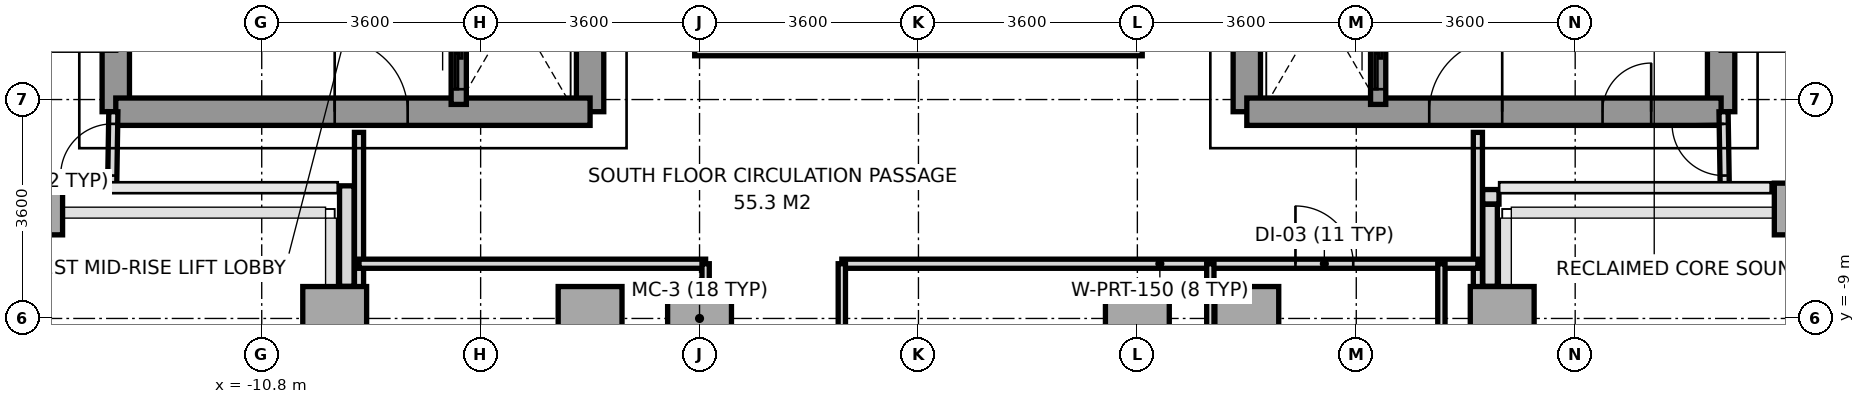
"""IFC4 building model, lengths in metres.
Left out: names, types, materials, properties, quantities, classifications, styles, units other than length and angle.
Written with IfcOpenShell. Run it as: python <this file> out.ifc"""

import sys

from ifc_helpers import new_model, si_unit, direction, frame, frame_2d, origin, origin_2d, place, context, subcontext, project, spatial, rectangle, extrude, source, transform, mapped, element, fill, save


model = new_model("IFC4")
c1 = context("Model", 3, precision=1e-05, world=origin(), true_north=direction((0.0, 1.0)))
c2 = subcontext(c1, "Body", "Model", "MODEL_VIEW")
j1 = project(units=[si_unit("LENGTHUNIT", "METRE"), si_unit("PLANEANGLEUNIT", "RADIAN")], contexts=[c1])
p1 = place(None, origin())
s1 = spatial("IfcSite", under=j1, at=p1, CompositionType="ELEMENT")
p2 = place(p1, origin())
s2 = spatial("IfcBuilding", under=s1, at=p2, CompositionType="ELEMENT")
p3 = place(p2, frame((0.0, 0.0, 134.6)))
s3 = spatial("IfcBuildingStorey", under=s2, at=p3, CompositionType="ELEMENT", Elevation=134.6)
m1 = source(origin(), c2, "Body", "SweptSolid", [
    extrude(rectangle(XDim=0.65, YDim=0.85, at=origin_2d()), origin(), (0.0, 0.0, 1.0), 3.2),
])
p4 = place(p3, frame((-14.4, -7.2, 0.0), z_axis=(0.0, 0.0, 1.0), x_axis=(1.0, 0.0, 0.0)))
e1 = element("IfcColumn", 1, at=p4, inside=s3, PredefinedType="COLUMN", context=c2, shape_type="MappedRepresentation", body=[
    mapped(m1, transform((0.0, 0.0, 0.0), x_axis=(1.0, 0.0, 0.0), y_axis=(0.0, 1.0, 0.0), z_axis=(0.0, 0.0, 1.0), scale=1.0)),
])
m2 = source(origin(), c2, "Body", "SweptSolid", [
    extrude(rectangle(XDim=1.05, YDim=1.05, at=origin_2d()), origin(), (0.0, 0.0, 1.0), 3.2),
])
for number, where, z_axis, x_axis in (
    (2, (-9.6, -9.0, 0.0), (0.0, 0.0, 1.0), (1.0, 0.0, 0.0)),
    (3, (-5.4, -9.0, 0.0), (0.0, 0.0, 1.0), (1.0, 0.0, 0.0)),
    (4, (-3.6, -9.0, 0.0), (0.0, 0.0, 1.0), (1.0, 0.0, 0.0)),
    (5, (3.6, -9.0, 0.0), (0.0, 0.0, 1.0), (1.0, 0.0, 0.0)),
    (6, (5.4, -9.0, 0.0), (0.0, 0.0, 1.0), (1.0, 0.0, 0.0)),
    (7, (9.6, -9.0, 0.0), (0.0, 0.0, 1.0), (1.0, 0.0, 0.0)),
):
    element("IfcColumn", number, at=place(p3, frame(where, z_axis=z_axis, x_axis=x_axis)), inside=s3, PredefinedType="COLUMN", context=c2, shape_type="MappedRepresentation", body=[
        mapped(m2, transform((0.0, 0.0, 0.0), x_axis=(1.0, 0.0, 0.0), y_axis=(0.0, 1.0, 0.0), z_axis=(0.0, 0.0, 1.0), scale=1.0)),
    ])
p5 = place(p3, frame((14.4, -7.2, 0.0), z_axis=(0.0, 0.0, 1.0), x_axis=(1.0, 0.0, 0.0)))
e8 = element("IfcColumn", 8, at=p5, inside=s3, PredefinedType="COLUMN", context=c2, shape_type="MappedRepresentation", body=[
    mapped(m1, transform((0.0, 0.0, 0.0), x_axis=(1.0, 0.0, 0.0), y_axis=(0.0, 1.0, 0.0), z_axis=(0.0, 0.0, 1.0), scale=1.0)),
])
p6 = place(p3, frame((9.547, -7.0, 0.0), z_axis=(0.0, 0.0, 1.0), x_axis=(-1.0, 0.0, 0.0)))
e9 = element("IfcWall", 9, at=p6, inside=s3, PredefinedType="PARAPET", context=c2, shape_type="SweptSolid", body=[
    extrude(rectangle(XDim=0.269, YDim=0.24, at=frame_2d((0.135, 0.0))), origin(), (0.0, 0.0, 1.0), 1.15),
])
p7 = place(p3, frame((9.4, -7.123, 0.0), z_axis=(0.0, 0.0, 1.0), x_axis=(0.0, -1.0, 0.0)))
e10 = element("IfcWall", 10, at=p7, inside=s3, PredefinedType="PARAPET", context=c2, shape_type="SweptSolid", body=[
    extrude(rectangle(XDim=1.349, YDim=0.24, at=frame_2d((0.674, 0.0))), origin(), (0.0, 0.0, 1.0), 1.15),
])
p8 = place(p3, frame((-9.4, -8.472, 0.0), z_axis=(0.0, 0.0, 1.0), x_axis=(0.0, 1.0, 0.0)))
e11 = element("IfcWall", 11, at=p8, inside=s3, PredefinedType="PARAPET", context=c2, shape_type="SweptSolid", body=[
    extrude(rectangle(XDim=1.653, YDim=0.24, at=frame_2d((0.827, 0.0))), origin(), (0.0, 0.0, 1.0), 1.15),
])
p9 = place(p3, frame((-13.2, -5.6, 0.0), z_axis=(0.0, 0.0, 1.0), x_axis=(0.0, 1.0, 0.0)))
e12 = element("IfcWall", 12, at=p9, inside=s3, PredefinedType="SHEAR", context=c2, shape_type="SweptSolid", body=[
    extrude(rectangle(XDim=11.2, YDim=0.45, at=frame_2d((5.6, 0.0))), origin(), (0.0, 0.0, 1.0), 3.2),
])
p10 = place(p3, frame((-5.4, -5.6, 0.0), z_axis=(0.0, 0.0, 1.0), x_axis=(0.0, 1.0, 0.0)))
e13 = element("IfcWall", 13, at=p10, inside=s3, PredefinedType="SHEAR", context=c2, shape_type="SweptSolid", body=[
    extrude(rectangle(XDim=12.5, YDim=0.45, at=frame_2d((6.25, 0.0))), origin(), (0.0, 0.0, 1.0), 3.2),
])
p11 = place(p10, frame((4.55, 0.0, 0.0)))
e14 = element("IfcOpeningElement", 14, at=p11, cuts=e13, PredefinedType="OPENING", context=c2, shape_type="SweptSolid", body=[
    extrude(rectangle(XDim=1.2, YDim=2.2, at=frame_2d((0.6, 1.1))), frame((0.0, 0.235, 0.0), z_axis=(0.0, -1.0, 0.0), x_axis=(1.0, 0.0, 0.0)), (0.0, 0.0, 1.0), 0.47),
])
p12 = place(p3, frame((-13.2, -5.6, 0.0), z_axis=(0.0, 0.0, 1.0), x_axis=(1.0, 0.0, 0.0)))
e15 = element("IfcWall", 15, at=p12, inside=s3, PredefinedType="SHEAR", context=c2, shape_type="SweptSolid", body=[
    extrude(rectangle(XDim=7.8, YDim=0.45, at=frame_2d((3.9, 0.0))), origin(), (0.0, 0.0, 1.0), 3.2),
])
p13 = place(p12, frame((3.6, 0.0, 0.0)))
e16 = element("IfcOpeningElement", 16, at=p13, cuts=e15, PredefinedType="OPENING", context=c2, shape_type="SweptSolid", body=[
    extrude(rectangle(XDim=1.2, YDim=2.2, at=frame_2d((0.6, 1.1))), frame((0.0, 0.235, 0.0), z_axis=(0.0, -1.0, 0.0), x_axis=(1.0, 0.0, 0.0)), (0.0, 0.0, 1.0), 0.47),
])
p14 = place(p3, frame((13.2, -5.6, 0.0), z_axis=(0.0, 0.0, 1.0), x_axis=(0.0, 1.0, 0.0)))
e17 = element("IfcWall", 17, at=p14, inside=s3, PredefinedType="SHEAR", context=c2, shape_type="SweptSolid", body=[
    extrude(rectangle(XDim=11.2, YDim=0.45, at=frame_2d((5.6, 0.0))), origin(), (0.0, 0.0, 1.0), 3.2),
])
p15 = place(p3, frame((5.4, -5.6, 0.0), z_axis=(0.0, 0.0, 1.0), x_axis=(0.0, 1.0, 0.0)))
e18 = element("IfcWall", 18, at=p15, inside=s3, PredefinedType="SHEAR", context=c2, shape_type="SweptSolid", body=[
    extrude(rectangle(XDim=12.5, YDim=0.45, at=frame_2d((6.25, 0.0))), origin(), (0.0, 0.0, 1.0), 3.2),
])
p16 = place(p15, frame((4.55, 0.0, 0.0)))
e19 = element("IfcOpeningElement", 19, at=p16, cuts=e18, PredefinedType="OPENING", context=c2, shape_type="SweptSolid", body=[
    extrude(rectangle(XDim=1.2, YDim=2.2, at=frame_2d((0.6, 1.1))), frame((0.0, 0.235, 0.0), z_axis=(0.0, -1.0, 0.0), x_axis=(1.0, 0.0, 0.0)), (0.0, 0.0, 1.0), 0.47),
])
p17 = place(p15, frame((7.88, 0.0, 0.0)))
e20 = element("IfcOpeningElement", 20, at=p17, cuts=e18, PredefinedType="OPENING", context=c2, shape_type="SweptSolid", body=[
    extrude(rectangle(XDim=0.8, YDim=2.1, at=frame_2d((0.4, 1.05))), frame((0.0, 0.235, 0.0), z_axis=(0.0, -1.0, 0.0), x_axis=(1.0, 0.0, 0.0)), (0.0, 0.0, 1.0), 0.47),
])
p18 = place(p3, frame((5.4, -5.6, 0.0), z_axis=(0.0, 0.0, 1.0), x_axis=(1.0, 0.0, 0.0)))
e21 = element("IfcWall", 21, at=p18, inside=s3, PredefinedType="SHEAR", context=c2, shape_type="SweptSolid", body=[
    extrude(rectangle(XDim=7.8, YDim=0.45, at=frame_2d((3.9, 0.0))), origin(), (0.0, 0.0, 1.0), 3.2),
])
p19 = place(p18, frame((3.0, 0.0, 0.0)))
e22 = element("IfcOpeningElement", 22, at=p19, cuts=e21, PredefinedType="OPENING", context=c2, shape_type="SweptSolid", body=[
    extrude(rectangle(XDim=1.2, YDim=2.2, at=frame_2d((0.6, 1.1))), frame((0.0, 0.235, 0.0), z_axis=(0.0, -1.0, 0.0), x_axis=(1.0, 0.0, 0.0)), (0.0, 0.0, 1.0), 0.47),
])
p20 = place(p18, frame((5.85, 0.0, 0.0)))
e23 = element("IfcOpeningElement", 23, at=p20, cuts=e21, PredefinedType="OPENING", context=c2, shape_type="SweptSolid", body=[
    extrude(rectangle(XDim=0.8, YDim=2.1, at=frame_2d((0.4, 1.05))), frame((0.0, 0.235, 0.0), z_axis=(0.0, -1.0, 0.0), x_axis=(1.0, 0.0, 0.0)), (0.0, 0.0, 1.0), 0.47),
])
p21 = place(p3, frame((-7.56, -5.48, 0.0), z_axis=(0.0, 0.0, 1.0), x_axis=(0.0, 1.0, 0.0)))
e24 = element("IfcWall", 24, at=p21, inside=s3, PredefinedType="SOLIDWALL", context=c2, shape_type="SweptSolid", body=[
    extrude(rectangle(XDim=1.6, YDim=0.25, at=frame_2d((0.8, 0.0))), origin(), (0.0, 0.0, 1.0), 3.2),
])
p22 = place(p21, frame((0.25, 0.0, 0.0)))
e25 = element("IfcOpeningElement", 25, at=p22, cuts=e24, PredefinedType="OPENING", context=c2, shape_type="SweptSolid", body=[
    extrude(rectangle(XDim=1.1, YDim=2.2, at=frame_2d((0.55, 1.1))), frame((0.0, 0.135, 0.0), z_axis=(0.0, -1.0, 0.0), x_axis=(1.0, 0.0, 0.0)), (0.0, 0.0, 1.0), 0.27),
])
p23 = place(p3, frame((7.56, -5.48, 0.0), z_axis=(0.0, 0.0, 1.0), x_axis=(0.0, 1.0, 0.0)))
e26 = element("IfcWall", 26, at=p23, inside=s3, PredefinedType="SOLIDWALL", context=c2, shape_type="SweptSolid", body=[
    extrude(rectangle(XDim=1.6, YDim=0.25, at=frame_2d((0.8, 0.0))), origin(), (0.0, 0.0, 1.0), 3.2),
])
p24 = place(p23, frame((0.25, 0.0, 0.0)))
e27 = element("IfcOpeningElement", 27, at=p24, cuts=e26, PredefinedType="OPENING", context=c2, shape_type="SweptSolid", body=[
    extrude(rectangle(XDim=1.1, YDim=2.2, at=frame_2d((0.55, 1.1))), frame((0.0, 0.135, 0.0), z_axis=(0.0, -1.0, 0.0), x_axis=(1.0, 0.0, 0.0)), (0.0, 0.0, 1.0), 0.27),
])
for number, where, z_axis, x_axis in (
    (28, (-9.2, -15.68, 0.0), (0.0, 0.0, 1.0), (0.0, 1.0, 0.0)),
    (29, (9.2, -15.68, 0.0), (0.0, 0.0, 1.0), (0.0, 1.0, 0.0)),
):
    element("IfcWall", number, at=place(p3, frame(where, z_axis=z_axis, x_axis=x_axis)), inside=s3, PredefinedType="PARTITIONING", context=c2, shape_type="SweptSolid", body=[
        extrude(rectangle(XDim=9.74, YDim=0.15, at=frame_2d((4.87, 0.0))), origin(), (0.0, 0.0, 1.0), 2.7),
    ])
p25 = place(p3, frame((-9.2, -8.1, 0.0), z_axis=(0.0, 0.0, 1.0), x_axis=(1.0, 0.0, 0.0)))
e30 = element("IfcWall", 30, at=p25, inside=s3, PredefinedType="PARTITIONING", context=c2, shape_type="SweptSolid", body=[
    extrude(rectangle(XDim=5.7, YDim=0.15, at=frame_2d((2.85, 0.0))), origin(), (0.0, 0.0, 1.0), 2.75),
])
p26 = place(p3, frame((-1.26, -8.1, 0.0), z_axis=(0.0, 0.0, 1.0), x_axis=(1.0, 0.0, 0.0)))
e31 = element("IfcWall", 31, at=p26, inside=s3, PredefinedType="PARTITIONING", context=c2, shape_type="SweptSolid", body=[
    extrude(rectangle(XDim=10.46, YDim=0.15, at=frame_2d((5.23, 0.0))), origin(), (0.0, 0.0, 1.0), 2.75),
])
p27 = place(p26, frame((7.46, 0.0, 0.0)))
e32 = element("IfcOpeningElement", 32, at=p27, cuts=e31, PredefinedType="OPENING", context=c2, shape_type="SweptSolid", body=[
    extrude(rectangle(XDim=0.95, YDim=2.15, at=frame_2d((0.475, 1.075))), frame((0.0, 0.085, 0.0), z_axis=(0.0, -1.0, 0.0), x_axis=(1.0, 0.0, 0.0)), (0.0, 0.0, 1.0), 0.17),
])
p28 = place(p3, frame((-3.5, -19.3, 0.0), z_axis=(0.0, 0.0, 1.0), x_axis=(0.0, 1.0, 0.0)))
e33 = element("IfcWall", 33, at=p28, inside=s3, PredefinedType="PARTITIONING", context=c2, shape_type="SweptSolid", body=[
    extrude(rectangle(XDim=11.2, YDim=0.12, at=frame_2d((5.6, 0.0))), origin(), (0.0, 0.0, 1.0), 2.7),
])
p29 = place(p28, frame((7.9, 0.0, 0.0)))
e34 = element("IfcOpeningElement", 34, at=p29, cuts=e33, PredefinedType="OPENING", context=c2, shape_type="SweptSolid", body=[
    extrude(rectangle(XDim=0.95, YDim=2.15, at=frame_2d((0.475, 1.075))), frame((0.0, 0.07, 0.0), z_axis=(0.0, -1.0, 0.0), x_axis=(1.0, 0.0, 0.0)), (0.0, 0.0, 1.0), 0.14),
])
p30 = place(p28, frame((4.5, 0.0, 0.0)))
e35 = element("IfcOpeningElement", 35, at=p30, cuts=e33, PredefinedType="OPENING", context=c2, shape_type="SweptSolid", body=[
    extrude(rectangle(XDim=0.95, YDim=2.15, at=frame_2d((0.475, 1.075))), frame((0.0, 0.07, 0.0), z_axis=(0.0, -1.0, 0.0), x_axis=(1.0, 0.0, 0.0)), (0.0, 0.0, 1.0), 0.14),
])
p31 = place(p28, frame((1.0, 0.0, 0.0)))
e36 = element("IfcOpeningElement", 36, at=p31, cuts=e33, PredefinedType="OPENING", context=c2, shape_type="SweptSolid", body=[
    extrude(rectangle(XDim=0.95, YDim=2.15, at=frame_2d((0.475, 1.075))), frame((0.0, 0.07, 0.0), z_axis=(0.0, -1.0, 0.0), x_axis=(1.0, 0.0, 0.0)), (0.0, 0.0, 1.0), 0.14),
])
p32 = place(p3, frame((-1.26, -19.3, 0.0), z_axis=(0.0, 0.0, 1.0), x_axis=(0.0, 1.0, 0.0)))
e37 = element("IfcWall", 37, at=p32, inside=s3, PredefinedType="PARTITIONING", context=c2, shape_type="SweptSolid", body=[
    extrude(rectangle(XDim=11.2, YDim=0.12, at=frame_2d((5.6, 0.0))), origin(), (0.0, 0.0, 1.0), 2.7),
])
p33 = place(p32, frame((1.8, 0.0, 0.0)))
e38 = element("IfcOpeningElement", 38, at=p33, cuts=e37, PredefinedType="OPENING", context=c2, shape_type="SweptSolid", body=[
    extrude(rectangle(XDim=1.1, YDim=2.2, at=frame_2d((0.55, 1.1))), frame((0.0, 0.07, 0.0), z_axis=(0.0, -1.0, 0.0), x_axis=(1.0, 0.0, 0.0)), (0.0, 0.0, 1.0), 0.14),
])
p34 = place(p3, frame((4.8, -11.5, 0.0), z_axis=(0.0, 0.0, 1.0), x_axis=(0.0, 1.0, 0.0)))
e39 = element("IfcWall", 39, at=p34, inside=s3, PredefinedType="PARTITIONING", context=c2, shape_type="SweptSolid", body=[
    extrude(rectangle(XDim=3.4, YDim=0.12, at=frame_2d((1.7, 0.0))), origin(), (0.0, 0.0, 1.0), 3.2),
])
p35 = place(p3, frame((8.6, -11.5, 0.0), z_axis=(0.0, 0.0, 1.0), x_axis=(0.0, 1.0, 0.0)))
e40 = element("IfcWall", 40, at=p35, inside=s3, PredefinedType="PARTITIONING", context=c2, shape_type="SweptSolid", body=[
    extrude(rectangle(XDim=3.4, YDim=0.12, at=frame_2d((1.7, 0.0))), origin(), (0.0, 0.0, 1.0), 2.7),
])
p36 = place(p3, frame((-13.26, -6.85, 0.0), z_axis=(0.0, 0.0, 1.0), x_axis=(0.016013571389, 0.999871774545, 0.0)))
e41 = element("IfcWall", 41, at=p36, inside=s3, PredefinedType="PARTITIONING", context=c2, shape_type="SweptSolid", body=[
    extrude(rectangle(XDim=1.25, YDim=0.15, at=frame_2d((0.625, 0.0))), origin(), (0.0, 0.0, 1.0), 3.2),
])
p37 = place(p36, frame((0.2, 0.0, 0.0)))
e42 = element("IfcOpeningElement", 42, at=p37, cuts=e41, PredefinedType="OPENING", context=c2, shape_type="SweptSolid", body=[
    extrude(rectangle(XDim=0.85, YDim=2.1, at=frame_2d((0.425, 1.05))), frame((0.0, 0.085, 0.0), z_axis=(0.0, -1.0, 0.0), x_axis=(1.0, 0.0, 0.0)), (0.0, 0.0, 1.0), 0.17),
])
p38 = place(p3, frame((13.26, -6.85, 0.0), z_axis=(0.0, 0.0, 1.0), x_axis=(-0.016013571389, 0.999871774545, 0.0)))
e43 = element("IfcWall", 43, at=p38, inside=s3, PredefinedType="PARTITIONING", context=c2, shape_type="SweptSolid", body=[
    extrude(rectangle(XDim=1.25, YDim=0.15, at=frame_2d((0.625, 0.0))), origin(), (0.0, 0.0, 1.0), 3.2),
])
p39 = place(p38, frame((0.2, 0.0, 0.0)))
e44 = element("IfcOpeningElement", 44, at=p39, cuts=e43, PredefinedType="OPENING", context=c2, shape_type="SweptSolid", body=[
    extrude(rectangle(XDim=0.85, YDim=2.1, at=frame_2d((0.425, 1.05))), frame((0.0, 0.085, 0.0), z_axis=(0.0, -1.0, 0.0), x_axis=(1.0, 0.0, 0.0)), (0.0, 0.0, 1.0), 0.17),
])
p40 = place(p3, frame((-3.68, -4.56, 0.0), z_axis=(0.0, 0.0, 1.0), x_axis=(1.0, 0.0, 0.0)))
e45 = element("IfcWall", 45, at=p40, inside=s3, PredefinedType="PARAPET", context=c2, shape_type="SweptSolid", body=[
    extrude(rectangle(XDim=7.36, YDim=0.24, at=frame_2d((3.68, 0.0))), origin(), (0.0, 0.0, 1.0), 1.15),
])
m3 = source(origin(), c2, "Body", "SweptSolid", [
    extrude(rectangle(XDim=1.2, YDim=2.2, at=frame_2d((0.6, 1.1))), frame((0.0, 0.025, 0.0), z_axis=(0.0, -1.0, 0.0), x_axis=(1.0, 0.0, 0.0)), (0.0, 0.0, 1.0), 0.05),
])
p41 = place(p13, origin())
e46 = element("IfcDoor", 46, at=p41, inside=s3, OperationType="SINGLE_SWING_LEFT", PredefinedType="DOOR", context=c2, shape_type="MappedRepresentation", body=[
    mapped(m3, transform((0.0, 0.0, 0.0), x_axis=(1.0, 0.0, 0.0), y_axis=(0.0, 1.0, 0.0), z_axis=(0.0, 0.0, 1.0), scale=1.0)),
])
fill(e16, e46)
p42 = place(p19, origin())
e47 = element("IfcDoor", 47, at=p42, inside=s3, OperationType="SINGLE_SWING_RIGHT", PredefinedType="DOOR", context=c2, shape_type="MappedRepresentation", body=[
    mapped(m3, transform((0.0, 0.0, 0.0), x_axis=(1.0, 0.0, 0.0), y_axis=(0.0, 1.0, 0.0), z_axis=(0.0, 0.0, 1.0), scale=1.0)),
])
fill(e22, e47)
m4 = source(origin(), c2, "Body", "SweptSolid", [
    extrude(rectangle(XDim=0.8, YDim=2.1, at=frame_2d((0.4, 1.05))), frame((0.0, 0.025, 0.0), z_axis=(0.0, -1.0, 0.0), x_axis=(1.0, 0.0, 0.0)), (0.0, 0.0, 1.0), 0.05),
])
p43 = place(p20, origin())
e48 = element("IfcDoor", 48, at=p43, inside=s3, OperationType="SINGLE_SWING_RIGHT", PredefinedType="DOOR", context=c2, shape_type="MappedRepresentation", body=[
    mapped(m4, transform((0.0, 0.0, 0.0), x_axis=(1.0, 0.0, 0.0), y_axis=(0.0, 1.0, 0.0), z_axis=(0.0, 0.0, 1.0), scale=1.0)),
])
fill(e23, e48)
m5 = source(origin(), c2, "Body", "SweptSolid", [
    extrude(rectangle(XDim=1.1, YDim=2.2, at=frame_2d((0.55, 1.1))), frame((0.0, 0.025, 0.0), z_axis=(0.0, -1.0, 0.0), x_axis=(1.0, 0.0, 0.0)), (0.0, 0.0, 1.0), 0.05),
])
p44 = place(p22, origin())
e49 = element("IfcDoor", 49, at=p44, inside=s3, OperationType="SLIDING_TO_LEFT", PredefinedType="DOOR", context=c2, shape_type="MappedRepresentation", body=[
    mapped(m5, transform((0.0, 0.0, 0.0), x_axis=(1.0, 0.0, 0.0), y_axis=(0.0, 1.0, 0.0), z_axis=(0.0, 0.0, 1.0), scale=1.0)),
])
fill(e25, e49)
p45 = place(p24, origin())
e50 = element("IfcDoor", 50, at=p45, inside=s3, OperationType="SLIDING_TO_LEFT", PredefinedType="DOOR", context=c2, shape_type="MappedRepresentation", body=[
    mapped(m5, transform((0.0, 0.0, 0.0), x_axis=(1.0, 0.0, 0.0), y_axis=(0.0, 1.0, 0.0), z_axis=(0.0, 0.0, 1.0), scale=1.0)),
])
fill(e27, e50)
m6 = source(origin(), c2, "Body", "SweptSolid", [
    extrude(rectangle(XDim=0.95, YDim=2.15, at=frame_2d((0.475, 1.075))), frame((0.0, 0.025, 0.0), z_axis=(0.0, -1.0, 0.0), x_axis=(1.0, 0.0, 0.0)), (0.0, 0.0, 1.0), 0.05),
])
p46 = place(p27, origin())
e51 = element("IfcDoor", 51, at=p46, inside=s3, OperationType="SINGLE_SWING_LEFT", PredefinedType="DOOR", context=c2, shape_type="MappedRepresentation", body=[
    mapped(m6, transform((0.0, 0.0, 0.0), x_axis=(1.0, 0.0, 0.0), y_axis=(0.0, 1.0, 0.0), z_axis=(0.0, 0.0, 1.0), scale=1.0)),
])
fill(e32, e51)
m7 = source(origin(), c2, "Body", "SweptSolid", [
    extrude(rectangle(XDim=0.85, YDim=2.1, at=frame_2d((0.425, 1.05))), frame((0.0, 0.025, 0.0), z_axis=(0.0, -1.0, 0.0), x_axis=(1.0, 0.0, 0.0)), (0.0, 0.0, 1.0), 0.05),
])
p47 = place(p37, origin())
e52 = element("IfcDoor", 52, at=p47, inside=s3, OperationType="SINGLE_SWING_LEFT", PredefinedType="DOOR", context=c2, shape_type="MappedRepresentation", body=[
    mapped(m7, transform((0.0, 0.0, 0.0), x_axis=(1.0, 0.0, 0.0), y_axis=(0.0, 1.0, 0.0), z_axis=(0.0, 0.0, 1.0), scale=1.0)),
])
fill(e42, e52)
p48 = place(p39, origin())
e53 = element("IfcDoor", 53, at=p48, inside=s3, OperationType="SINGLE_SWING_RIGHT", PredefinedType="DOOR", context=c2, shape_type="MappedRepresentation", body=[
    mapped(m7, transform((0.0, 0.0, 0.0), x_axis=(1.0, 0.0, 0.0), y_axis=(0.0, 1.0, 0.0), z_axis=(0.0, 0.0, 1.0), scale=1.0)),
])
fill(e44, e53)
save(model, sys.argv[1])
